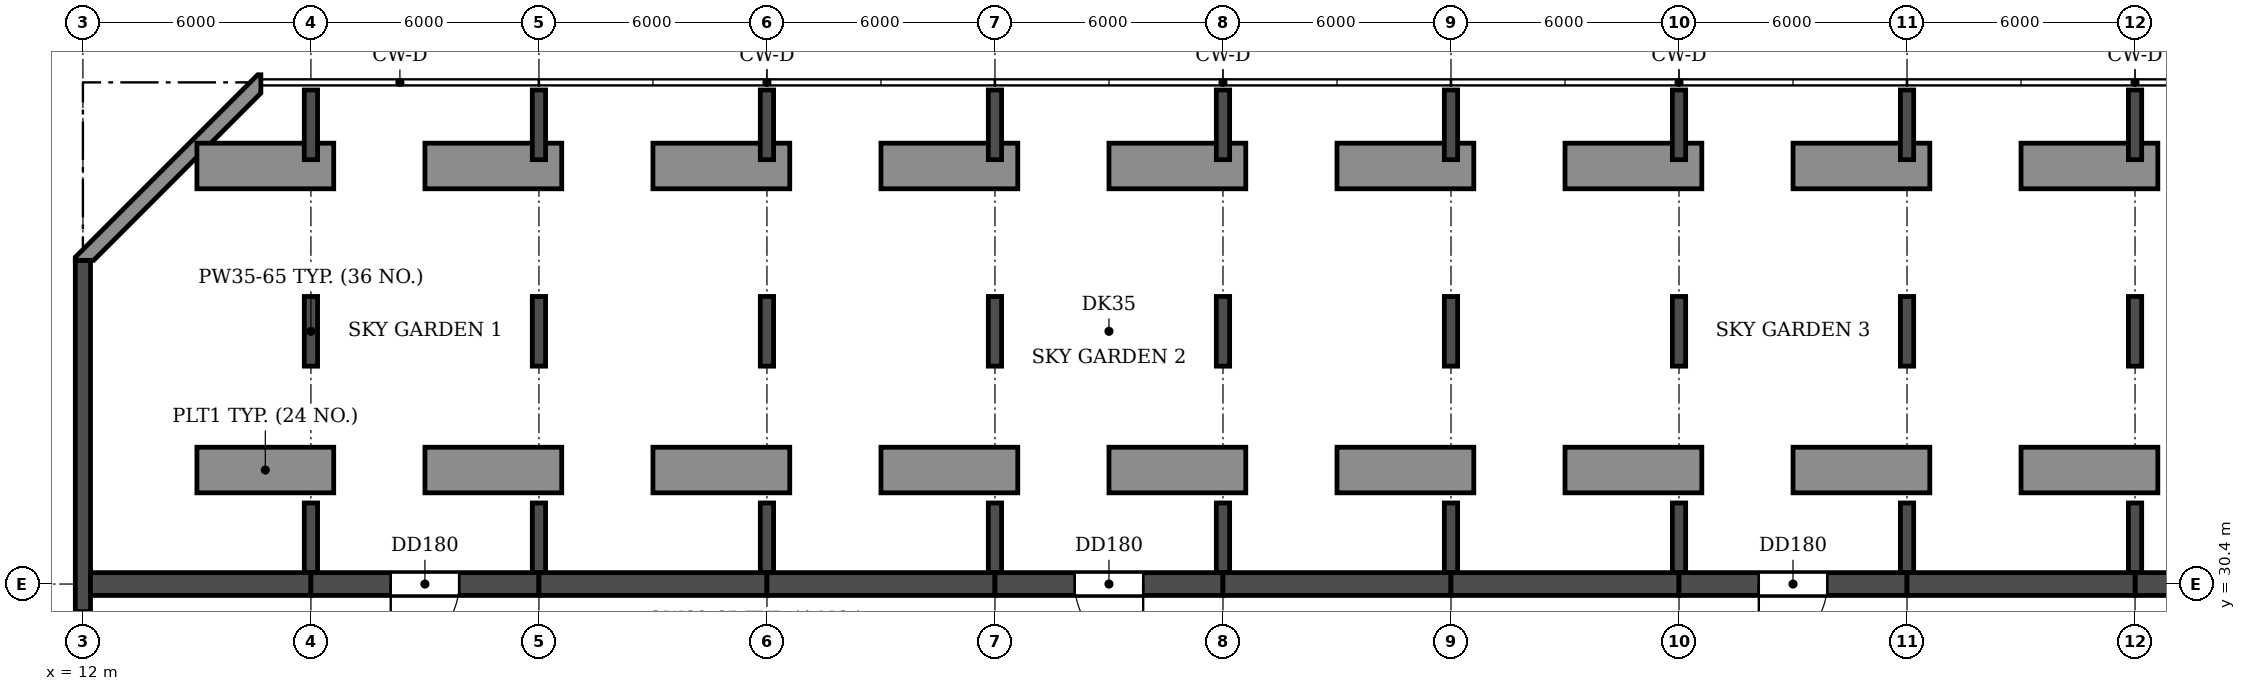
"""IFC4 building model, lengths in metres.
Left out: names, types, materials, properties, quantities, classifications, styles, units other than length and angle.
Written with IfcOpenShell. Run it as: python <this file> out.ifc"""

import sys

from ifc_helpers import new_model, si_unit, direction, frame, frame_2d, origin, place, context, subcontext, project, spatial, polyline, rectangle, outline, extrude, source, transform, mapped, element, fill, save


model = new_model("IFC4")
c1 = context("Model", 3, precision=1e-05, world=origin(), true_north=direction((0.0, 1.0)))
c2 = subcontext(c1, "Body", "Model", "MODEL_VIEW")
j1 = project(units=[si_unit("LENGTHUNIT", "METRE"), si_unit("PLANEANGLEUNIT", "RADIAN")], contexts=[c1])
p1 = place(None, origin())
s1 = spatial("IfcSite", under=j1, at=p1, CompositionType="ELEMENT")
p2 = place(p1, origin())
s2 = spatial("IfcBuilding", under=s1, at=p2, CompositionType="ELEMENT")
p3 = place(p2, frame((0.0, 0.0, 115.8)))
s3 = spatial("IfcBuildingStorey", under=s2, at=p3, CompositionType="ELEMENT", Elevation=115.8)
p4 = place(p3, frame((18.0, 30.7, 0.0), z_axis=(0.0, 0.0, 1.0), x_axis=(0.0, 1.0, 0.0)))
e1 = element("IfcWall", 1, at=p4, inside=s3, PredefinedType="SHEAR", context=c2, shape_type="SweptSolid", body=[
    extrude(rectangle(XDim=1.833, YDim=0.35, at=frame_2d((0.917, 0.0))), origin(), (0.0, 0.0, 1.0), 6.37),
])
p5 = place(p3, frame((18.0, 36.133, 0.0), z_axis=(0.0, 0.0, 1.0), x_axis=(0.0, 1.0, 0.0)))
e2 = element("IfcWall", 2, at=p5, inside=s3, PredefinedType="SHEAR", context=c2, shape_type="SweptSolid", body=[
    extrude(rectangle(XDim=1.833, YDim=0.35, at=frame_2d((0.917, 0.0))), origin(), (0.0, 0.0, 1.0), 6.37),
])
for number, where, z_axis, x_axis in (
    (3, (18.0, 41.567, 0.0), (0.0, 0.0, 1.0), (0.0, 1.0, 0.0)),
    (4, (24.0, 30.7, 0.0), (0.0, 0.0, 1.0), (0.0, 1.0, 0.0)),
):
    element("IfcWall", number, at=place(p3, frame(where, z_axis=z_axis, x_axis=x_axis)), inside=s3, PredefinedType="SHEAR", context=c2, shape_type="SweptSolid", body=[
        extrude(rectangle(XDim=1.833, YDim=0.35, at=frame_2d((0.917, 0.0))), origin(), (0.0, 0.0, 1.0), 6.37),
    ])
p6 = place(p3, frame((24.0, 36.133, 0.0), z_axis=(0.0, 0.0, 1.0), x_axis=(0.0, 1.0, 0.0)))
e5 = element("IfcWall", 5, at=p6, inside=s3, PredefinedType="SHEAR", context=c2, shape_type="SweptSolid", body=[
    extrude(rectangle(XDim=1.833, YDim=0.35, at=frame_2d((0.917, 0.0))), origin(), (0.0, 0.0, 1.0), 6.37),
])
for number, where, z_axis, x_axis in (
    (6, (24.0, 41.567, 0.0), (0.0, 0.0, 1.0), (0.0, 1.0, 0.0)),
    (7, (30.0, 30.7, 0.0), (0.0, 0.0, 1.0), (0.0, 1.0, 0.0)),
):
    element("IfcWall", number, at=place(p3, frame(where, z_axis=z_axis, x_axis=x_axis)), inside=s3, PredefinedType="SHEAR", context=c2, shape_type="SweptSolid", body=[
        extrude(rectangle(XDim=1.833, YDim=0.35, at=frame_2d((0.917, 0.0))), origin(), (0.0, 0.0, 1.0), 6.37),
    ])
p7 = place(p3, frame((30.0, 36.133, 0.0), z_axis=(0.0, 0.0, 1.0), x_axis=(0.0, 1.0, 0.0)))
e8 = element("IfcWall", 8, at=p7, inside=s3, PredefinedType="SHEAR", context=c2, shape_type="SweptSolid", body=[
    extrude(rectangle(XDim=1.833, YDim=0.35, at=frame_2d((0.917, 0.0))), origin(), (0.0, 0.0, 1.0), 6.37),
])
for number, where, z_axis, x_axis in (
    (9, (30.0, 41.567, 0.0), (0.0, 0.0, 1.0), (0.0, 1.0, 0.0)),
    (10, (36.0, 30.7, 0.0), (0.0, 0.0, 1.0), (0.0, 1.0, 0.0)),
):
    element("IfcWall", number, at=place(p3, frame(where, z_axis=z_axis, x_axis=x_axis)), inside=s3, PredefinedType="SHEAR", context=c2, shape_type="SweptSolid", body=[
        extrude(rectangle(XDim=1.833, YDim=0.35, at=frame_2d((0.917, 0.0))), origin(), (0.0, 0.0, 1.0), 6.37),
    ])
p8 = place(p3, frame((36.0, 36.133, 0.0), z_axis=(0.0, 0.0, 1.0), x_axis=(0.0, 1.0, 0.0)))
e11 = element("IfcWall", 11, at=p8, inside=s3, PredefinedType="SHEAR", context=c2, shape_type="SweptSolid", body=[
    extrude(rectangle(XDim=1.833, YDim=0.35, at=frame_2d((0.917, 0.0))), origin(), (0.0, 0.0, 1.0), 6.37),
])
for number, where, z_axis, x_axis in (
    (12, (36.0, 41.567, 0.0), (0.0, 0.0, 1.0), (0.0, 1.0, 0.0)),
    (13, (42.0, 30.7, 0.0), (0.0, 0.0, 1.0), (0.0, 1.0, 0.0)),
):
    element("IfcWall", number, at=place(p3, frame(where, z_axis=z_axis, x_axis=x_axis)), inside=s3, PredefinedType="SHEAR", context=c2, shape_type="SweptSolid", body=[
        extrude(rectangle(XDim=1.833, YDim=0.35, at=frame_2d((0.917, 0.0))), origin(), (0.0, 0.0, 1.0), 6.37),
    ])
p9 = place(p3, frame((42.0, 36.133, 0.0), z_axis=(0.0, 0.0, 1.0), x_axis=(0.0, 1.0, 0.0)))
e14 = element("IfcWall", 14, at=p9, inside=s3, PredefinedType="SHEAR", context=c2, shape_type="SweptSolid", body=[
    extrude(rectangle(XDim=1.833, YDim=0.35, at=frame_2d((0.917, 0.0))), origin(), (0.0, 0.0, 1.0), 6.37),
])
for number, where, z_axis, x_axis in (
    (15, (42.0, 41.567, 0.0), (0.0, 0.0, 1.0), (0.0, 1.0, 0.0)),
    (16, (48.0, 30.7, 0.0), (0.0, 0.0, 1.0), (0.0, 1.0, 0.0)),
):
    element("IfcWall", number, at=place(p3, frame(where, z_axis=z_axis, x_axis=x_axis)), inside=s3, PredefinedType="SHEAR", context=c2, shape_type="SweptSolid", body=[
        extrude(rectangle(XDim=1.833, YDim=0.35, at=frame_2d((0.917, 0.0))), origin(), (0.0, 0.0, 1.0), 6.37),
    ])
p10 = place(p3, frame((48.0, 36.133, 0.0), z_axis=(0.0, 0.0, 1.0), x_axis=(0.0, 1.0, 0.0)))
e17 = element("IfcWall", 17, at=p10, inside=s3, PredefinedType="SHEAR", context=c2, shape_type="SweptSolid", body=[
    extrude(rectangle(XDim=1.833, YDim=0.35, at=frame_2d((0.917, 0.0))), origin(), (0.0, 0.0, 1.0), 6.37),
])
for number, where, z_axis, x_axis in (
    (18, (48.0, 41.567, 0.0), (0.0, 0.0, 1.0), (0.0, 1.0, 0.0)),
    (19, (54.0, 30.7, 0.0), (0.0, 0.0, 1.0), (0.0, 1.0, 0.0)),
):
    element("IfcWall", number, at=place(p3, frame(where, z_axis=z_axis, x_axis=x_axis)), inside=s3, PredefinedType="SHEAR", context=c2, shape_type="SweptSolid", body=[
        extrude(rectangle(XDim=1.833, YDim=0.35, at=frame_2d((0.917, 0.0))), origin(), (0.0, 0.0, 1.0), 6.37),
    ])
p11 = place(p3, frame((54.0, 36.133, 0.0), z_axis=(0.0, 0.0, 1.0), x_axis=(0.0, 1.0, 0.0)))
e20 = element("IfcWall", 20, at=p11, inside=s3, PredefinedType="SHEAR", context=c2, shape_type="SweptSolid", body=[
    extrude(rectangle(XDim=1.833, YDim=0.35, at=frame_2d((0.917, 0.0))), origin(), (0.0, 0.0, 1.0), 6.37),
])
for number, where, z_axis, x_axis in (
    (21, (54.0, 41.567, 0.0), (0.0, 0.0, 1.0), (0.0, 1.0, 0.0)),
    (22, (60.0, 30.7, 0.0), (0.0, 0.0, 1.0), (0.0, 1.0, 0.0)),
):
    element("IfcWall", number, at=place(p3, frame(where, z_axis=z_axis, x_axis=x_axis)), inside=s3, PredefinedType="SHEAR", context=c2, shape_type="SweptSolid", body=[
        extrude(rectangle(XDim=1.833, YDim=0.35, at=frame_2d((0.917, 0.0))), origin(), (0.0, 0.0, 1.0), 6.37),
    ])
p12 = place(p3, frame((60.0, 36.133, 0.0), z_axis=(0.0, 0.0, 1.0), x_axis=(0.0, 1.0, 0.0)))
e23 = element("IfcWall", 23, at=p12, inside=s3, PredefinedType="SHEAR", context=c2, shape_type="SweptSolid", body=[
    extrude(rectangle(XDim=1.833, YDim=0.35, at=frame_2d((0.917, 0.0))), origin(), (0.0, 0.0, 1.0), 6.37),
])
for number, where, z_axis, x_axis in (
    (24, (60.0, 41.567, 0.0), (0.0, 0.0, 1.0), (0.0, 1.0, 0.0)),
    (25, (66.0, 30.7, 0.0), (0.0, 0.0, 1.0), (0.0, 1.0, 0.0)),
):
    element("IfcWall", number, at=place(p3, frame(where, z_axis=z_axis, x_axis=x_axis)), inside=s3, PredefinedType="SHEAR", context=c2, shape_type="SweptSolid", body=[
        extrude(rectangle(XDim=1.833, YDim=0.35, at=frame_2d((0.917, 0.0))), origin(), (0.0, 0.0, 1.0), 6.37),
    ])
p13 = place(p3, frame((66.0, 36.133, 0.0), z_axis=(0.0, 0.0, 1.0), x_axis=(0.0, 1.0, 0.0)))
e26 = element("IfcWall", 26, at=p13, inside=s3, PredefinedType="SHEAR", context=c2, shape_type="SweptSolid", body=[
    extrude(rectangle(XDim=1.833, YDim=0.35, at=frame_2d((0.917, 0.0))), origin(), (0.0, 0.0, 1.0), 6.37),
])
p14 = place(p3, frame((66.0, 41.567, 0.0), z_axis=(0.0, 0.0, 1.0), x_axis=(0.0, 1.0, 0.0)))
e27 = element("IfcWall", 27, at=p14, inside=s3, PredefinedType="SHEAR", context=c2, shape_type="SweptSolid", body=[
    extrude(rectangle(XDim=1.833, YDim=0.35, at=frame_2d((0.917, 0.0))), origin(), (0.0, 0.0, 1.0), 6.37),
])
p15 = place(p3, frame((12.0, 4.683, 0.0), z_axis=(0.0, 0.0, 1.0), x_axis=(0.0, 1.0, 0.0)))
e28 = element("IfcWall", 28, at=p15, inside=s3, PredefinedType="SHEAR", context=c2, shape_type="SweptSolid", body=[
    extrude(rectangle(XDim=34.234, YDim=0.4, at=frame_2d((17.117, 0.0))), origin(), (0.0, 0.0, 1.0), 6.37),
])
p16 = place(p15, frame((23.817, 0.0, 0.9)))
e29 = element("IfcOpeningElement", 29, at=p16, cuts=e28, PredefinedType="OPENING", context=c2, shape_type="SweptSolid", body=[
    extrude(rectangle(XDim=1.2, YDim=1.5, at=frame_2d((0.6, 0.75))), frame((0.0, 0.21, 0.0), z_axis=(0.0, -1.0, 0.0), x_axis=(1.0, 0.0, 0.0)), (0.0, 0.0, 1.0), 0.42),
])
p17 = place(p15, frame((8.017, 0.0, 0.9)))
e30 = element("IfcOpeningElement", 30, at=p17, cuts=e28, PredefinedType="OPENING", context=c2, shape_type="SweptSolid", body=[
    extrude(rectangle(XDim=1.2, YDim=1.5, at=frame_2d((0.6, 0.75))), frame((0.0, 0.21, 0.0), z_axis=(0.0, -1.0, 0.0), x_axis=(1.0, 0.0, 0.0)), (0.0, 0.0, 1.0), 0.42),
])
p18 = place(p15, frame((13.317, 0.0, 0.9)))
e31 = element("IfcOpeningElement", 31, at=p18, cuts=e28, PredefinedType="OPENING", context=c2, shape_type="SweptSolid", body=[
    extrude(rectangle(XDim=1.2, YDim=1.5, at=frame_2d((0.6, 0.75))), frame((0.0, 0.21, 0.0), z_axis=(0.0, -1.0, 0.0), x_axis=(1.0, 0.0, 0.0)), (0.0, 0.0, 1.0), 0.42),
])
p19 = place(p3, frame((12.2, 30.4, 0.0), z_axis=(0.0, 0.0, 1.0), x_axis=(1.0, 0.0, 0.0)))
e32 = element("IfcWall", 32, at=p19, inside=s3, PredefinedType="SHEAR", context=c2, shape_type="SweptSolid", body=[
    extrude(rectangle(XDim=5.8, YDim=0.6, at=frame_2d((2.9, 0.0))), origin(), (0.0, 0.0, 1.0), 6.37),
])
p20 = place(p3, frame((18.0, 30.4, 0.0), z_axis=(0.0, 0.0, 1.0), x_axis=(1.0, 0.0, 0.0)))
e33 = element("IfcWall", 33, at=p20, inside=s3, PredefinedType="SHEAR", context=c2, shape_type="SweptSolid", body=[
    extrude(rectangle(XDim=6.0, YDim=0.6, at=frame_2d((3.0, 0.0))), origin(), (0.0, 0.0, 1.0), 6.37),
])
p21 = place(p20, frame((2.1, 0.0, 0.0)))
e34 = element("IfcOpeningElement", 34, at=p21, cuts=e33, PredefinedType="OPENING", context=c2, shape_type="SweptSolid", body=[
    extrude(rectangle(XDim=1.8, YDim=2.1, at=frame_2d((0.9, 1.05))), frame((0.0, 0.31, 0.0), z_axis=(0.0, -1.0, 0.0), x_axis=(1.0, 0.0, 0.0)), (0.0, 0.0, 1.0), 0.62),
])
for number, where, z_axis, x_axis in (
    (35, (24.0, 30.4, 0.0), (0.0, 0.0, 1.0), (1.0, 0.0, 0.0)),
    (36, (30.0, 30.4, 0.0), (0.0, 0.0, 1.0), (1.0, 0.0, 0.0)),
):
    element("IfcWall", number, at=place(p3, frame(where, z_axis=z_axis, x_axis=x_axis)), inside=s3, PredefinedType="SHEAR", context=c2, shape_type="SweptSolid", body=[
        extrude(rectangle(XDim=6.0, YDim=0.6, at=frame_2d((3.0, 0.0))), origin(), (0.0, 0.0, 1.0), 6.37),
    ])
p22 = place(p3, frame((36.0, 30.4, 0.0), z_axis=(0.0, 0.0, 1.0), x_axis=(1.0, 0.0, 0.0)))
e37 = element("IfcWall", 37, at=p22, inside=s3, PredefinedType="SHEAR", context=c2, shape_type="SweptSolid", body=[
    extrude(rectangle(XDim=6.0, YDim=0.6, at=frame_2d((3.0, 0.0))), origin(), (0.0, 0.0, 1.0), 6.37),
])
p23 = place(p22, frame((2.1, 0.0, 0.0)))
e38 = element("IfcOpeningElement", 38, at=p23, cuts=e37, PredefinedType="OPENING", context=c2, shape_type="SweptSolid", body=[
    extrude(rectangle(XDim=1.8, YDim=2.1, at=frame_2d((0.9, 1.05))), frame((0.0, 0.31, 0.0), z_axis=(0.0, -1.0, 0.0), x_axis=(1.0, 0.0, 0.0)), (0.0, 0.0, 1.0), 0.62),
])
for number, where, z_axis, x_axis in (
    (39, (42.0, 30.4, 0.0), (0.0, 0.0, 1.0), (1.0, 0.0, 0.0)),
    (40, (48.0, 30.4, 0.0), (0.0, 0.0, 1.0), (1.0, 0.0, 0.0)),
):
    element("IfcWall", number, at=place(p3, frame(where, z_axis=z_axis, x_axis=x_axis)), inside=s3, PredefinedType="SHEAR", context=c2, shape_type="SweptSolid", body=[
        extrude(rectangle(XDim=6.0, YDim=0.6, at=frame_2d((3.0, 0.0))), origin(), (0.0, 0.0, 1.0), 6.37),
    ])
p24 = place(p3, frame((54.0, 30.4, 0.0), z_axis=(0.0, 0.0, 1.0), x_axis=(1.0, 0.0, 0.0)))
e41 = element("IfcWall", 41, at=p24, inside=s3, PredefinedType="SHEAR", context=c2, shape_type="SweptSolid", body=[
    extrude(rectangle(XDim=6.0, YDim=0.6, at=frame_2d((3.0, 0.0))), origin(), (0.0, 0.0, 1.0), 6.37),
])
p25 = place(p24, frame((2.1, 0.0, 0.0)))
e42 = element("IfcOpeningElement", 42, at=p25, cuts=e41, PredefinedType="OPENING", context=c2, shape_type="SweptSolid", body=[
    extrude(rectangle(XDim=1.8, YDim=2.1, at=frame_2d((0.9, 1.05))), frame((0.0, 0.31, 0.0), z_axis=(0.0, -1.0, 0.0), x_axis=(1.0, 0.0, 0.0)), (0.0, 0.0, 1.0), 0.62),
])
for number, where, z_axis, x_axis in (
    (43, (60.0, 30.4, 0.0), (0.0, 0.0, 1.0), (1.0, 0.0, 0.0)),
    (44, (66.0, 30.4, 0.0), (0.0, 0.0, 1.0), (1.0, 0.0, 0.0)),
):
    element("IfcWall", number, at=place(p3, frame(where, z_axis=z_axis, x_axis=x_axis)), inside=s3, PredefinedType="SHEAR", context=c2, shape_type="SweptSolid", body=[
        extrude(rectangle(XDim=6.0, YDim=0.6, at=frame_2d((3.0, 0.0))), origin(), (0.0, 0.0, 1.0), 6.37),
    ])
p26 = place(p3, origin())
e45 = element("IfcWall", 45, at=p26, inside=s3, PredefinedType="STANDARD", context=c2, shape_type="SweptSolid", body=[
    extrude(outline(polyline([(16.683, 43.8), (16.6, 43.8), (11.8, 39.0), (11.8, 38.917), (12.283, 38.917), (16.683, 43.317), (16.683, 43.8)])), origin(), (0.0, 0.0, 1.0), 6.37),
])
m1 = source(origin(), c2, "Body", "SweptSolid", [
    extrude(outline(polyline([(0.0, 0.0), (3.6, 0.0), (3.6, 1.2), (0.0, 1.2), (0.0, 0.0)])), origin(), (0.0, 0.0, 1.0), 0.6),
])
for number, where in (
    (46, (15.0, 32.8, 0.0)),
    (47, (21.0, 32.8, 0.0)),
    (48, (27.0, 32.8, 0.0)),
    (49, (33.0, 32.8, 0.0)),
    (50, (39.0, 32.8, 0.0)),
    (51, (45.0, 32.8, 0.0)),
    (52, (51.0, 32.8, 0.0)),
    (53, (57.0, 32.8, 0.0)),
    (54, (63.0, 32.8, 0.0)),
    (55, (15.0, 40.8, 0.0)),
    (56, (21.0, 40.8, 0.0)),
    (57, (27.0, 40.8, 0.0)),
    (58, (33.0, 40.8, 0.0)),
    (59, (39.0, 40.8, 0.0)),
    (60, (45.0, 40.8, 0.0)),
    (61, (51.0, 40.8, 0.0)),
    (62, (57.0, 40.8, 0.0)),
    (63, (63.0, 40.8, 0.0)),
):
    element("IfcWall", number, at=place(p3, frame(where)), inside=s3, PredefinedType="USERDEFINED", context=c2, shape_type="MappedRepresentation", body=[
        mapped(m1, transform((0.0, 0.0, 0.0))),
    ])
p27 = place(p16, origin())
e64 = element("IfcWindow", 64, at=p27, inside=s3, PartitioningType="SINGLE_PANEL", PredefinedType="WINDOW", context=c2, shape_type="SweptSolid", body=[
    extrude(rectangle(XDim=1.2, YDim=1.5, at=frame_2d((0.6, 0.75))), frame((0.0, 0.03, 0.0), z_axis=(0.0, -1.0, 0.0), x_axis=(1.0, 0.0, 0.0)), (0.0, 0.0, 1.0), 0.06),
])
fill(e29, e64)
p28 = place(p21, frame((1.8, 0.0, 0.0), z_axis=(0.0, 0.0, 1.0), x_axis=(-1.0, 0.0, 0.0)))
e65 = element("IfcDoor", 65, at=p28, inside=s3, OperationType="DOUBLE_DOOR_SINGLE_SWING", PredefinedType="DOOR", context=c2, shape_type="SweptSolid", body=[
    extrude(rectangle(XDim=1.8, YDim=2.1, at=frame_2d((0.9, 1.05))), frame((0.0, 0.025, 0.0), z_axis=(0.0, -1.0, 0.0), x_axis=(1.0, 0.0, 0.0)), (0.0, 0.0, 1.0), 0.05),
])
fill(e34, e65)
p29 = place(p23, frame((1.8, 0.0, 0.0), z_axis=(0.0, 0.0, 1.0), x_axis=(-1.0, 0.0, 0.0)))
e66 = element("IfcDoor", 66, at=p29, inside=s3, OperationType="DOUBLE_DOOR_SINGLE_SWING", PredefinedType="DOOR", context=c2, shape_type="SweptSolid", body=[
    extrude(rectangle(XDim=1.8, YDim=2.1, at=frame_2d((0.9, 1.05))), frame((0.0, 0.025, 0.0), z_axis=(0.0, -1.0, 0.0), x_axis=(1.0, 0.0, 0.0)), (0.0, 0.0, 1.0), 0.05),
])
fill(e38, e66)
p30 = place(p25, frame((1.8, 0.0, 0.0), z_axis=(0.0, 0.0, 1.0), x_axis=(-1.0, 0.0, 0.0)))
e67 = element("IfcDoor", 67, at=p30, inside=s3, OperationType="DOUBLE_DOOR_SINGLE_SWING", PredefinedType="DOOR", context=c2, shape_type="SweptSolid", body=[
    extrude(rectangle(XDim=1.8, YDim=2.1, at=frame_2d((0.9, 1.05))), frame((0.0, 0.025, 0.0), z_axis=(0.0, -1.0, 0.0), x_axis=(1.0, 0.0, 0.0)), (0.0, 0.0, 1.0), 0.05),
])
fill(e42, e67)
save(model, sys.argv[1])
